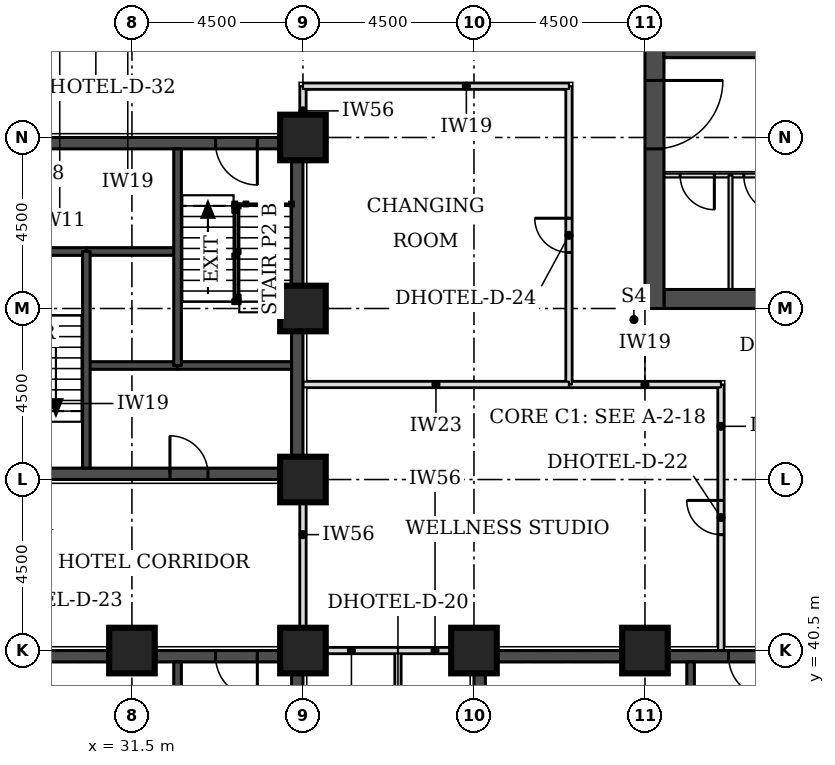
"""IFC4 building model, lengths in metres.
Left out: names, types, materials, properties, quantities, classifications, styles, units other than length and angle.
Written with IfcOpenShell. Run it as: python <this file> out.ifc"""

import sys

from ifc_helpers import new_model, si_unit, direction, frame, frame_2d, origin, origin_2d, place, context, subcontext, project, spatial, rectangle, extrude, element, fill, save


model = new_model("IFC4")
c1 = context("Model", 3, precision=1e-05, world=origin(), true_north=direction((0.0, 1.0)))
c2 = subcontext(c1, "Body", "Model", "MODEL_VIEW")
j1 = project(units=[si_unit("LENGTHUNIT", "METRE"), si_unit("PLANEANGLEUNIT", "RADIAN")], contexts=[c1])
p1 = place(None, origin())
s1 = spatial("IfcSite", under=j1, at=p1, CompositionType="ELEMENT")
p2 = place(p1, origin())
s2 = spatial("IfcBuilding", under=s1, at=p2, CompositionType="ELEMENT")
p3 = place(p2, frame((0.0, 0.0, 59.4)))
s3 = spatial("IfcBuildingStorey", under=s2, at=p3, CompositionType="ELEMENT", Elevation=59.4)
for number, where, z_axis, x_axis in (
    (1, (31.5, 40.5, 0.0), (0.0, 0.0, 1.0), (1.0, 0.0, 0.0)),
    (2, (36.0, 40.5, 0.0), (0.0, 0.0, 1.0), (1.0, 0.0, 0.0)),
    (3, (40.5, 40.5, 0.0), (0.0, 0.0, 1.0), (1.0, 0.0, 0.0)),
    (4, (45.0, 40.5, 0.0), (0.0, 0.0, 1.0), (1.0, 0.0, 0.0)),
    (5, (36.0, 45.0, 0.0), (0.0, 0.0, 1.0), (1.0, 0.0, 0.0)),
    (6, (36.0, 49.5, 0.0), (0.0, 0.0, 1.0), (1.0, 0.0, 0.0)),
    (7, (36.0, 54.0, 0.0), (0.0, 0.0, 1.0), (1.0, 0.0, 0.0)),
):
    element("IfcColumn", number, at=place(p3, frame(where, z_axis=z_axis, x_axis=x_axis)), inside=s3, PredefinedType="COLUMN", context=c2, shape_type="SweptSolid", body=[
        extrude(rectangle(XDim=1.2, YDim=1.2, at=origin_2d()), origin(), (0.0, 0.0, 1.0), 3.3),
    ])
p4 = place(p3, frame((45.5, 49.75, 0.0), z_axis=(0.0, 0.0, 1.0), x_axis=(1.0, 0.0, 0.0)))
e8 = element("IfcWall", 8, at=p4, inside=s3, PredefinedType="SHEAR", context=c2, shape_type="SweptSolid", body=[
    extrude(rectangle(XDim=21.5, YDim=0.5, at=frame_2d((10.75, 0.0))), origin(), (0.0, 0.0, 1.0), 3.3),
])
p5 = place(p3, frame((45.25, 49.5, 0.0), z_axis=(0.0, 0.0, 1.0), x_axis=(0.0, 1.0, 0.0)))
e9 = element("IfcWall", 9, at=p5, inside=s3, PredefinedType="SHEAR", context=c2, shape_type="SweptSolid", body=[
    extrude(rectangle(XDim=22.5, YDim=0.5, at=frame_2d((11.25, 0.0))), origin(), (0.0, 0.0, 1.0), 3.3),
])
p6 = place(p5, frame((4.2, 0.0, 0.0)))
e10 = element("IfcOpeningElement", 10, at=p6, cuts=e9, PredefinedType="OPENING", context=c2, shape_type="SweptSolid", body=[
    extrude(rectangle(XDim=1.8, YDim=2.1, at=frame_2d((0.9, 1.05))), frame((0.0, 0.26, 0.0), z_axis=(0.0, -1.0, 0.0), x_axis=(1.0, 0.0, 0.0)), (0.0, 0.0, 1.0), 0.52),
])
p7 = place(p5, frame((6.9, 0.0, 0.0)))
e11 = element("IfcOpeningElement", 11, at=p7, cuts=e9, PredefinedType="OPENING", context=c2, shape_type="SweptSolid", body=[
    extrude(rectangle(XDim=1.1, YDim=2.1, at=frame_2d((0.55, 1.05))), frame((0.0, 0.26, 0.0), z_axis=(0.0, -1.0, 0.0), x_axis=(1.0, 0.0, 0.0)), (0.0, 0.0, 1.0), 0.52),
])
p8 = place(p5, frame((13.6, 0.0, 0.0)))
e12 = element("IfcOpeningElement", 12, at=p8, cuts=e9, PredefinedType="OPENING", context=c2, shape_type="SweptSolid", body=[
    extrude(rectangle(XDim=1.1, YDim=2.1, at=frame_2d((0.55, 1.05))), frame((0.0, 0.26, 0.0), z_axis=(0.0, -1.0, 0.0), x_axis=(1.0, 0.0, 0.0)), (0.0, 0.0, 1.0), 0.52),
])
p9 = place(p5, frame((16.5, 0.0, 0.0)))
e13 = element("IfcOpeningElement", 13, at=p9, cuts=e9, PredefinedType="OPENING", context=c2, shape_type="SweptSolid", body=[
    extrude(rectangle(XDim=1.8, YDim=2.1, at=frame_2d((0.9, 1.05))), frame((0.0, 0.26, 0.0), z_axis=(0.0, -1.0, 0.0), x_axis=(1.0, 0.0, 0.0)), (0.0, 0.0, 1.0), 0.52),
])
p10 = place(p3, frame((27.3, 45.15, 0.0), z_axis=(0.0, 0.0, 1.0), x_axis=(1.0, 0.0, 0.0)))
e14 = element("IfcWall", 14, at=p10, inside=s3, PredefinedType="SHEAR", context=c2, shape_type="SweptSolid", body=[
    extrude(rectangle(XDim=8.4, YDim=0.3, at=frame_2d((4.2, 0.0))), origin(), (0.0, 0.0, 1.0), 3.3),
])
p11 = place(p10, frame((5.2, 0.0, 0.0)))
e15 = element("IfcOpeningElement", 15, at=p11, cuts=e14, PredefinedType="OPENING", context=c2, shape_type="SweptSolid", body=[
    extrude(rectangle(XDim=1.0, YDim=2.1, at=frame_2d((0.5, 1.05))), frame((0.0, 0.16, 0.0), z_axis=(0.0, -1.0, 0.0), x_axis=(1.0, 0.0, 0.0)), (0.0, 0.0, 1.0), 0.32),
])
p12 = place(p3, frame((27.3, 53.85, 0.0), z_axis=(0.0, 0.0, 1.0), x_axis=(1.0, 0.0, 0.0)))
e16 = element("IfcWall", 16, at=p12, inside=s3, PredefinedType="SHEAR", context=c2, shape_type="SweptSolid", body=[
    extrude(rectangle(XDim=8.4, YDim=0.3, at=frame_2d((4.2, 0.0))), origin(), (0.0, 0.0, 1.0), 3.3),
])
p13 = place(p12, frame((6.4, 0.0, 0.0)))
e17 = element("IfcOpeningElement", 17, at=p13, cuts=e16, PredefinedType="OPENING", context=c2, shape_type="SweptSolid", body=[
    extrude(rectangle(XDim=1.1, YDim=2.1, at=frame_2d((0.55, 1.05))), frame((0.0, 0.16, 0.0), z_axis=(0.0, -1.0, 0.0), x_axis=(1.0, 0.0, 0.0)), (0.0, 0.0, 1.0), 0.32),
])
p14 = place(p3, frame((35.85, 45.0, 0.0), z_axis=(0.0, 0.0, 1.0), x_axis=(0.0, 1.0, 0.0)))
e18 = element("IfcWall", 18, at=p14, inside=s3, PredefinedType="SHEAR", context=c2, shape_type="SweptSolid", body=[
    extrude(rectangle(XDim=9.0, YDim=0.3, at=frame_2d((4.5, 0.0))), origin(), (0.0, 0.0, 1.0), 3.3),
])
p15 = place(p3, frame((40.8, 40.35, 0.0), z_axis=(0.0, 0.0, 1.0), x_axis=(1.0, 0.0, 0.0)))
e19 = element("IfcWall", 19, at=p15, inside=s3, PredefinedType="SHEAR", context=c2, shape_type="SweptSolid", body=[
    extrude(rectangle(XDim=8.4, YDim=0.3, at=frame_2d((4.2, 0.0))), origin(), (0.0, 0.0, 1.0), 3.3),
])
p16 = place(p15, frame((6.4, 0.0, 0.0)))
e20 = element("IfcOpeningElement", 20, at=p16, cuts=e19, PredefinedType="OPENING", context=c2, shape_type="SweptSolid", body=[
    extrude(rectangle(XDim=1.1, YDim=2.1, at=frame_2d((0.55, 1.05))), frame((0.0, 0.16, 0.0), z_axis=(0.0, -1.0, 0.0), x_axis=(1.0, 0.0, 0.0)), (0.0, 0.0, 1.0), 0.32),
])
p17 = place(p3, frame((40.65, 31.5, 0.0), z_axis=(0.0, 0.0, 1.0), x_axis=(0.0, 1.0, 0.0)))
e21 = element("IfcWall", 21, at=p17, inside=s3, PredefinedType="SHEAR", context=c2, shape_type="SweptSolid", body=[
    extrude(rectangle(XDim=9.0, YDim=0.3, at=frame_2d((4.5, 0.0))), origin(), (0.0, 0.0, 1.0), 3.3),
])
p18 = place(p17, frame((0.4, 0.0, 0.0)))
e22 = element("IfcOpeningElement", 22, at=p18, cuts=e21, PredefinedType="OPENING", context=c2, shape_type="SweptSolid", body=[
    extrude(rectangle(XDim=1.1, YDim=2.1, at=frame_2d((0.55, 1.05))), frame((0.0, 0.16, 0.0), z_axis=(0.0, -1.0, 0.0), x_axis=(1.0, 0.0, 0.0)), (0.0, 0.0, 1.0), 0.32),
])
p19 = place(p3, frame((27.3, 40.35, 0.0), z_axis=(0.0, 0.0, 1.0), x_axis=(1.0, 0.0, 0.0)))
e23 = element("IfcWall", 23, at=p19, inside=s3, PredefinedType="SHEAR", context=c2, shape_type="SweptSolid", body=[
    extrude(rectangle(XDim=8.4, YDim=0.3, at=frame_2d((4.2, 0.0))), origin(), (0.0, 0.0, 1.0), 3.3),
])
p20 = place(p19, frame((6.4, 0.0, 0.0)))
e24 = element("IfcOpeningElement", 24, at=p20, cuts=e23, PredefinedType="OPENING", context=c2, shape_type="SweptSolid", body=[
    extrude(rectangle(XDim=1.1, YDim=2.1, at=frame_2d((0.55, 1.05))), frame((0.0, 0.16, 0.0), z_axis=(0.0, -1.0, 0.0), x_axis=(1.0, 0.0, 0.0)), (0.0, 0.0, 1.0), 0.32),
])
p21 = place(p3, frame((35.85, 31.5, 0.0), z_axis=(0.0, 0.0, 1.0), x_axis=(0.0, 1.0, 0.0)))
e25 = element("IfcWall", 25, at=p21, inside=s3, PredefinedType="SHEAR", context=c2, shape_type="SweptSolid", body=[
    extrude(rectangle(XDim=9.0, YDim=0.3, at=frame_2d((4.5, 0.0))), origin(), (0.0, 0.0, 1.0), 3.3),
])
p22 = place(p3, frame((38.5, 27.15, 0.0), z_axis=(0.0, 0.0, 1.0), x_axis=(0.0, 1.0, 0.0)))
e26 = element("IfcWall", 26, at=p22, inside=s3, PredefinedType="PARTITIONING", context=c2, shape_type="SweptSolid", body=[
    extrude(rectangle(XDim=13.35, YDim=0.15, at=frame_2d((6.675, 0.0))), origin(), (0.0, 0.0, 1.0), 3.08),
])
p23 = place(p22, frame((6.225, 0.0, 0.0)))
e27 = element("IfcOpeningElement", 27, at=p23, cuts=e26, PredefinedType="OPENING", context=c2, shape_type="SweptSolid", body=[
    extrude(rectangle(XDim=0.9, YDim=2.1, at=frame_2d((0.45, 1.05))), frame((0.0, 0.085, 0.0), z_axis=(0.0, -1.0, 0.0), x_axis=(1.0, 0.0, 0.0)), (0.0, 0.0, 1.0), 0.17),
])
p24 = place(p3, frame((38.5, 40.5, 0.0), z_axis=(0.0, 0.0, 1.0), x_axis=(1.0, 0.0, 0.0)))
e28 = element("IfcWall", 28, at=p24, inside=s3, PredefinedType="PARTITIONING", context=c2, shape_type="SweptSolid", body=[
    extrude(rectangle(XDim=1.95, YDim=0.15, at=frame_2d((0.975, 0.0))), origin(), (0.0, 0.0, 1.0), 2.33),
])
p25 = place(p3, frame((36.0, 40.55, 0.0), z_axis=(0.0, 0.0, 1.0), x_axis=(0.0, 1.0, 0.0)))
e29 = element("IfcWall", 29, at=p25, inside=s3, PredefinedType="PARTITIONING", context=c2, shape_type="SweptSolid", body=[
    extrude(rectangle(XDim=4.4, YDim=0.15, at=frame_2d((2.2, 0.0))), origin(), (0.0, 0.0, 1.0), 2.33),
])
p26 = place(p3, frame((47.0, 40.5, 0.0), z_axis=(0.0, 0.0, 1.0), x_axis=(0.0, 1.0, 0.0)))
e30 = element("IfcWall", 30, at=p26, inside=s3, PredefinedType="PARTITIONING", context=c2, shape_type="SweptSolid", body=[
    extrude(rectangle(XDim=7.0, YDim=0.15, at=frame_2d((3.5, 0.0))), origin(), (0.0, 0.0, 1.0), 3.08),
])
p27 = place(p26, frame((3.05, 0.0, 0.0)))
e31 = element("IfcOpeningElement", 31, at=p27, cuts=e30, PredefinedType="OPENING", context=c2, shape_type="SweptSolid", body=[
    extrude(rectangle(XDim=0.9, YDim=2.1, at=frame_2d((0.45, 1.05))), frame((0.0, 0.085, 0.0), z_axis=(0.0, -1.0, 0.0), x_axis=(1.0, 0.0, 0.0)), (0.0, 0.0, 1.0), 0.17),
])
p28 = place(p3, frame((43.0, 47.5, 0.0), z_axis=(0.0, 0.0, 1.0), x_axis=(1.0, 0.0, 0.0)))
e32 = element("IfcWall", 32, at=p28, inside=s3, PredefinedType="PARTITIONING", context=c2, shape_type="SweptSolid", body=[
    extrude(rectangle(XDim=4.0, YDim=0.15, at=frame_2d((2.0, 0.0))), origin(), (0.0, 0.0, 1.0), 3.08),
])
p29 = place(p3, frame((43.0, 47.5, 0.0), z_axis=(0.0, 0.0, 1.0), x_axis=(0.0, 1.0, 0.0)))
e33 = element("IfcWall", 33, at=p29, inside=s3, PredefinedType="PARTITIONING", context=c2, shape_type="SweptSolid", body=[
    extrude(rectangle(XDim=7.85, YDim=0.15, at=frame_2d((3.925, 0.0))), origin(), (0.0, 0.0, 1.0), 3.08),
])
p30 = place(p29, frame((3.475, 0.0, 0.0)))
e34 = element("IfcOpeningElement", 34, at=p30, cuts=e33, PredefinedType="OPENING", context=c2, shape_type="SweptSolid", body=[
    extrude(rectangle(XDim=0.9, YDim=2.1, at=frame_2d((0.45, 1.05))), frame((0.0, 0.085, 0.0), z_axis=(0.0, -1.0, 0.0), x_axis=(1.0, 0.0, 0.0)), (0.0, 0.0, 1.0), 0.17),
])
p31 = place(p3, frame((36.0, 54.05, 0.0), z_axis=(0.0, 0.0, 1.0), x_axis=(0.0, 1.0, 0.0)))
e35 = element("IfcWall", 35, at=p31, inside=s3, PredefinedType="PARTITIONING", context=c2, shape_type="SweptSolid", body=[
    extrude(rectangle(XDim=1.3, YDim=0.15, at=frame_2d((0.65, 0.0))), origin(), (0.0, 0.0, 1.0), 2.33),
])
p32 = place(p3, frame((36.0, 55.35, 0.0), z_axis=(0.0, 0.0, 1.0), x_axis=(1.0, 0.0, 0.0)))
e36 = element("IfcWall", 36, at=p32, inside=s3, PredefinedType="PARTITIONING", context=c2, shape_type="SweptSolid", body=[
    extrude(rectangle(XDim=7.0, YDim=0.15, at=frame_2d((3.5, 0.0))), origin(), (0.0, 0.0, 1.0), 3.08),
])
p33 = place(p3, frame((36.05, 40.5, 0.0), z_axis=(0.0, 0.0, 1.0), x_axis=(1.0, 0.0, 0.0)))
e37 = element("IfcWall", 37, at=p33, inside=s3, PredefinedType="PARTITIONING", context=c2, shape_type="SweptSolid", body=[
    extrude(rectangle(XDim=2.45, YDim=0.15, at=frame_2d((1.225, 0.0))), origin(), (0.0, 0.0, 1.0), 2.33),
])
p34 = place(p3, frame((36.0, 47.5, 0.0), z_axis=(0.0, 0.0, 1.0), x_axis=(1.0, 0.0, 0.0)))
e38 = element("IfcWall", 38, at=p34, inside=s3, PredefinedType="PARTITIONING", context=c2, shape_type="SweptSolid", body=[
    extrude(rectangle(XDim=7.0, YDim=0.15, at=frame_2d((3.5, 0.0))), origin(), (0.0, 0.0, 1.0), 3.08),
])
p35 = place(p3, frame((45.5, 53.0, 0.0), z_axis=(0.0, 0.0, 1.0), x_axis=(1.0, 0.0, 0.0)))
e39 = element("IfcWall", 39, at=p35, inside=s3, PredefinedType="PARTITIONING", context=c2, shape_type="SweptSolid", body=[
    extrude(rectangle(XDim=5.15, YDim=0.1, at=frame_2d((2.575, 0.0))), origin(), (0.0, 0.0, 1.0), 3.08),
])
p36 = place(p35, frame((0.426, 0.0, 0.0)))
e40 = element("IfcOpeningElement", 40, at=p36, cuts=e39, PredefinedType="OPENING", context=c2, shape_type="SweptSolid", body=[
    extrude(rectangle(XDim=0.9, YDim=2.1, at=frame_2d((0.45, 1.05))), frame((0.0, 0.06, 0.0), z_axis=(0.0, -1.0, 0.0), x_axis=(1.0, 0.0, 0.0)), (0.0, 0.0, 1.0), 0.12),
])
p37 = place(p35, frame((2.101, 0.0, 0.0)))
e41 = element("IfcOpeningElement", 41, at=p37, cuts=e39, PredefinedType="OPENING", context=c2, shape_type="SweptSolid", body=[
    extrude(rectangle(XDim=1.0, YDim=2.1, at=frame_2d((0.5, 1.05))), frame((0.0, 0.06, 0.0), z_axis=(0.0, -1.0, 0.0), x_axis=(1.0, 0.0, 0.0)), (0.0, 0.0, 1.0), 0.12),
])
p38 = place(p35, frame((3.85, 0.0, 0.0)))
e42 = element("IfcOpeningElement", 42, at=p38, cuts=e39, PredefinedType="OPENING", context=c2, shape_type="SweptSolid", body=[
    extrude(rectangle(XDim=0.9, YDim=2.1, at=frame_2d((0.45, 1.05))), frame((0.0, 0.06, 0.0), z_axis=(0.0, -1.0, 0.0), x_axis=(1.0, 0.0, 0.0)), (0.0, 0.0, 1.0), 0.12),
])
p39 = place(p3, frame((45.5, 56.2, 0.0), z_axis=(0.0, 0.0, 1.0), x_axis=(1.0, 0.0, 0.0)))
e43 = element("IfcWall", 43, at=p39, inside=s3, PredefinedType="SOLIDWALL", context=c2, shape_type="SweptSolid", body=[
    extrude(rectangle(XDim=3.1, YDim=0.2, at=frame_2d((1.55, 0.0))), origin(), (0.0, 0.0, 1.0), 3.08),
])
p40 = place(p3, frame((47.251, 50.0, 0.0), z_axis=(0.0, 0.0, 1.0), x_axis=(0.0, 1.0, 0.0)))
e44 = element("IfcWall", 44, at=p40, inside=s3, PredefinedType="PARTITIONING", context=c2, shape_type="SweptSolid", body=[
    extrude(rectangle(XDim=3.0, YDim=0.1, at=frame_2d((1.5, 0.0))), origin(), (0.0, 0.0, 1.0), 3.08),
])
p41 = place(p3, frame((30.3, 48.0, 0.0), z_axis=(0.0, 0.0, 1.0), x_axis=(1.0, 0.0, 0.0)))
e45 = element("IfcWall", 45, at=p41, inside=s3, PredefinedType="SOLIDWALL", context=c2, shape_type="SweptSolid", body=[
    extrude(rectangle(XDim=2.4, YDim=0.2, at=frame_2d((1.2, 0.0))), origin(), (0.0, 0.0, 1.0), 3.08),
])
p42 = place(p3, frame((32.7, 48.0, 0.0), z_axis=(0.0, 0.0, 1.0), x_axis=(1.0, 0.0, 0.0)))
e46 = element("IfcWall", 46, at=p42, inside=s3, PredefinedType="SOLIDWALL", context=c2, shape_type="SweptSolid", body=[
    extrude(rectangle(XDim=3.0, YDim=0.2, at=frame_2d((1.5, 0.0))), origin(), (0.0, 0.0, 1.0), 3.08),
])
p43 = place(p3, frame((30.3, 51.0, 0.0), z_axis=(0.0, 0.0, 1.0), x_axis=(1.0, 0.0, 0.0)))
e47 = element("IfcWall", 47, at=p43, inside=s3, PredefinedType="SOLIDWALL", context=c2, shape_type="SweptSolid", body=[
    extrude(rectangle(XDim=2.4, YDim=0.2, at=frame_2d((1.2, 0.0))), origin(), (0.0, 0.0, 1.0), 3.3),
])
p44 = place(p3, frame((27.3, 51.0, 0.0), z_axis=(0.0, 0.0, 1.0), x_axis=(1.0, 0.0, 0.0)))
e48 = element("IfcWall", 48, at=p44, inside=s3, PredefinedType="SOLIDWALL", context=c2, shape_type="SweptSolid", body=[
    extrude(rectangle(XDim=3.0, YDim=0.2, at=frame_2d((1.5, 0.0))), origin(), (0.0, 0.0, 1.0), 3.08),
])
for number, where, z_axis, x_axis in (
    (49, (30.3, 45.3, 0.0), (0.0, 0.0, 1.0), (0.0, 1.0, 0.0)),
    (50, (32.7, 48.0, 0.0), (0.0, 0.0, 1.0), (0.0, 1.0, 0.0)),
    (51, (46.2, 34.5, 0.0), (0.0, 0.0, 1.0), (0.0, 1.0, 0.0)),
    (52, (32.7, 34.5, 0.0), (0.0, 0.0, 1.0), (0.0, 1.0, 0.0)),
):
    element("IfcWall", number, at=place(p3, frame(where, z_axis=z_axis, x_axis=x_axis)), inside=s3, PredefinedType="SOLIDWALL", context=c2, shape_type="SweptSolid", body=[
        extrude(rectangle(XDim=5.7, YDim=0.2, at=frame_2d((2.85, 0.0))), origin(), (0.0, 0.0, 1.0), 3.08),
    ])
p45 = place(p30, origin())
e53 = element("IfcDoor", 53, at=p45, inside=s3, OperationType="SINGLE_SWING_RIGHT", PredefinedType="DOOR", context=c2, shape_type="SweptSolid", body=[
    extrude(rectangle(XDim=0.9, YDim=2.1, at=frame_2d((0.45, 1.05))), frame((0.0, 0.025, 0.0), z_axis=(0.0, -1.0, 0.0), x_axis=(1.0, 0.0, 0.0)), (0.0, 0.0, 1.0), 0.05),
])
fill(e34, e53)
p46 = place(p27, origin())
e54 = element("IfcDoor", 54, at=p46, inside=s3, OperationType="SINGLE_SWING_RIGHT", PredefinedType="DOOR", context=c2, shape_type="SweptSolid", body=[
    extrude(rectangle(XDim=0.9, YDim=2.1, at=frame_2d((0.45, 1.05))), frame((0.0, 0.025, 0.0), z_axis=(0.0, -1.0, 0.0), x_axis=(1.0, 0.0, 0.0)), (0.0, 0.0, 1.0), 0.05),
])
fill(e31, e54)
p47 = place(p6, frame((1.8, 0.0, 0.0), z_axis=(0.0, 0.0, 1.0), x_axis=(-1.0, 0.0, 0.0)))
e55 = element("IfcDoor", 55, at=p47, inside=s3, OperationType="SINGLE_SWING_LEFT", PredefinedType="DOOR", context=c2, shape_type="SweptSolid", body=[
    extrude(rectangle(XDim=1.8, YDim=2.1, at=frame_2d((0.9, 1.05))), frame((0.0, 0.025, 0.0), z_axis=(0.0, -1.0, 0.0), x_axis=(1.0, 0.0, 0.0)), (0.0, 0.0, 1.0), 0.05),
])
fill(e10, e55)
p48 = place(p36, frame((0.9, 0.0, 0.0), z_axis=(0.0, 0.0, 1.0), x_axis=(-1.0, 0.0, 0.0)))
e56 = element("IfcDoor", 56, at=p48, inside=s3, OperationType="SINGLE_SWING_LEFT", PredefinedType="DOOR", context=c2, shape_type="SweptSolid", body=[
    extrude(rectangle(XDim=0.9, YDim=2.1, at=frame_2d((0.45, 1.05))), frame((0.0, 0.025, 0.0), z_axis=(0.0, -1.0, 0.0), x_axis=(1.0, 0.0, 0.0)), (0.0, 0.0, 1.0), 0.05),
])
fill(e40, e56)
p49 = place(p37, frame((1.0, 0.0, 0.0), z_axis=(0.0, 0.0, 1.0), x_axis=(-1.0, 0.0, 0.0)))
e57 = element("IfcDoor", 57, at=p49, inside=s3, OperationType="SINGLE_SWING_LEFT", PredefinedType="DOOR", context=c2, shape_type="SweptSolid", body=[
    extrude(rectangle(XDim=1.0, YDim=2.1, at=frame_2d((0.5, 1.05))), frame((0.0, 0.025, 0.0), z_axis=(0.0, -1.0, 0.0), x_axis=(1.0, 0.0, 0.0)), (0.0, 0.0, 1.0), 0.05),
])
fill(e41, e57)
p50 = place(p13, frame((1.1, 0.0, 0.0), z_axis=(0.0, 0.0, 1.0), x_axis=(-1.0, 0.0, 0.0)))
e58 = element("IfcDoor", 58, at=p50, inside=s3, OperationType="SINGLE_SWING_LEFT", PredefinedType="DOOR", context=c2, shape_type="SweptSolid", body=[
    extrude(rectangle(XDim=1.1, YDim=2.1, at=frame_2d((0.55, 1.05))), frame((0.0, 0.025, 0.0), z_axis=(0.0, -1.0, 0.0), x_axis=(1.0, 0.0, 0.0)), (0.0, 0.0, 1.0), 0.05),
])
fill(e17, e58)
p51 = place(p11, origin())
e59 = element("IfcDoor", 59, at=p51, inside=s3, OperationType="SINGLE_SWING_LEFT", PredefinedType="DOOR", context=c2, shape_type="SweptSolid", body=[
    extrude(rectangle(XDim=1.0, YDim=2.1, at=frame_2d((0.5, 1.05))), frame((0.0, 0.025, 0.0), z_axis=(0.0, -1.0, 0.0), x_axis=(1.0, 0.0, 0.0)), (0.0, 0.0, 1.0), 0.05),
])
fill(e15, e59)
p52 = place(p16, frame((1.1, 0.0, 0.0), z_axis=(0.0, 0.0, 1.0), x_axis=(-1.0, 0.0, 0.0)))
e60 = element("IfcDoor", 60, at=p52, inside=s3, OperationType="SINGLE_SWING_LEFT", PredefinedType="DOOR", context=c2, shape_type="SweptSolid", body=[
    extrude(rectangle(XDim=1.1, YDim=2.1, at=frame_2d((0.55, 1.05))), frame((0.0, 0.025, 0.0), z_axis=(0.0, -1.0, 0.0), x_axis=(1.0, 0.0, 0.0)), (0.0, 0.0, 1.0), 0.05),
])
fill(e20, e60)
p53 = place(p20, frame((1.1, 0.0, 0.0), z_axis=(0.0, 0.0, 1.0), x_axis=(-1.0, 0.0, 0.0)))
e61 = element("IfcDoor", 61, at=p53, inside=s3, OperationType="SINGLE_SWING_LEFT", PredefinedType="DOOR", context=c2, shape_type="SweptSolid", body=[
    extrude(rectangle(XDim=1.1, YDim=2.1, at=frame_2d((0.55, 1.05))), frame((0.0, 0.025, 0.0), z_axis=(0.0, -1.0, 0.0), x_axis=(1.0, 0.0, 0.0)), (0.0, 0.0, 1.0), 0.05),
])
fill(e24, e61)
save(model, sys.argv[1])
